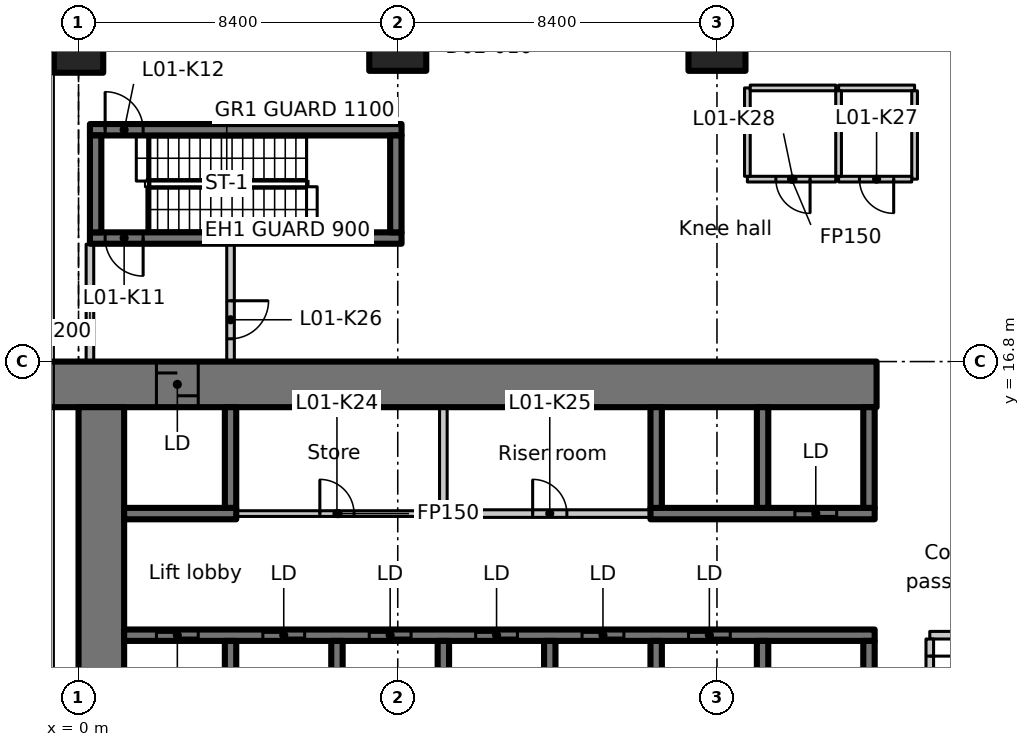
"""IFC4 building model, lengths in metres.
Left out: names, types, materials, properties, quantities, classifications, styles, units other than length and angle.
Written with IfcOpenShell. Run it as: python <this file> out.ifc"""

import sys

from ifc_helpers import new_model, si_unit, direction, frame, frame_2d, origin, origin_2d, place, context, subcontext, project, spatial, rectangle, extrude, element, fill, save


model = new_model("IFC4")
c1 = context("Model", 3, precision=1e-05, world=origin(), true_north=direction((0.0, 1.0)))
c2 = subcontext(c1, "Body", "Model", "MODEL_VIEW")
j1 = project(units=[si_unit("LENGTHUNIT", "METRE"), si_unit("PLANEANGLEUNIT", "RADIAN")], contexts=[c1])
p1 = place(None, origin())
s1 = spatial("IfcSite", under=j1, at=p1, CompositionType="ELEMENT")
p2 = place(p1, origin())
s2 = spatial("IfcBuilding", under=s1, at=p2, CompositionType="ELEMENT")
p3 = place(p2, frame((0.0, 0.0, 7.0)))
s3 = spatial("IfcBuildingStorey", under=s2, at=p3, CompositionType="ELEMENT", Elevation=7.0)
p4 = place(p3, frame((0.0, 25.2, 0.0), z_axis=(0.0, 0.0, 1.0), x_axis=(1.0, 0.0, 0.0)))
e1 = element("IfcColumn", 1, at=p4, inside=s3, PredefinedType="COLUMN", context=c2, shape_type="SweptSolid", body=[
    extrude(rectangle(XDim=1.3, YDim=1.6, at=origin_2d()), origin(), (0.0, 0.0, 1.0), 5.25),
])
for number, where, z_axis, x_axis in (
    (2, (8.4, 25.2, 0.0), (0.0, 0.0, 1.0), (1.0, 0.0, 0.0)),
    (3, (16.8, 25.2, 0.0), (0.0, 0.0, 1.0), (1.0, 0.0, 0.0)),
):
    element("IfcColumn", number, at=place(p3, frame(where, z_axis=z_axis, x_axis=x_axis)), inside=s3, PredefinedType="COLUMN", context=c2, shape_type="SweptSolid", body=[
        extrude(rectangle(XDim=1.5, YDim=1.5, at=origin_2d()), origin(), (0.0, 0.0, 1.0), 5.25),
    ])
p5 = place(p3, frame((-1.1, 16.2, 0.0), z_axis=(0.0, 0.0, 1.0), x_axis=(1.0, 0.0, 0.0)))
e4 = element("IfcWall", 4, at=p5, inside=s3, PredefinedType="SHEAR", context=c2, shape_type="SweptSolid", body=[
    extrude(rectangle(XDim=22.1, YDim=1.2, at=frame_2d((11.05, 0.0))), origin(), (0.0, 0.0, 1.0), 5.25),
])
p6 = place(p5, frame((3.15, 0.0, 0.0)))
e5 = element("IfcOpeningElement", 5, at=p6, cuts=e4, PredefinedType="OPENING", context=c2, shape_type="SweptSolid", body=[
    extrude(rectangle(XDim=1.1, YDim=2.3, at=frame_2d((0.55, 1.15))), frame((0.0, 0.61, 0.0), z_axis=(0.0, -1.0, 0.0), x_axis=(1.0, 0.0, 0.0)), (0.0, 0.0, 1.0), 1.22),
])
p7 = place(p3, frame((0.6, 6.736, 0.0), z_axis=(0.0, 0.0, 1.0), x_axis=(0.0, 1.0, 0.0)))
e6 = element("IfcWall", 6, at=p7, inside=s3, PredefinedType="SHEAR", context=c2, shape_type="SweptSolid", body=[
    extrude(rectangle(XDim=8.864, YDim=1.2, at=frame_2d((4.432, 0.0))), origin(), (0.0, 0.0, 1.0), 5.25),
])
p8 = place(p3, frame((1.2, 9.6, 0.0), z_axis=(0.0, 0.0, 1.0), x_axis=(1.0, 0.0, 0.0)))
e7 = element("IfcWall", 7, at=p8, inside=s3, PredefinedType="SHEAR", context=c2, shape_type="SweptSolid", body=[
    extrude(rectangle(XDim=19.75, YDim=0.3, at=frame_2d((9.875, 0.0))), origin(), (0.0, 0.0, 1.0), 5.25),
])
p9 = place(p8, frame((0.85, 0.0, 0.0)))
e8 = element("IfcOpeningElement", 8, at=p9, cuts=e7, PredefinedType="OPENING", context=c2, shape_type="SweptSolid", body=[
    extrude(rectangle(XDim=1.1, YDim=2.3, at=frame_2d((0.55, 1.15))), frame((0.0, 0.16, 0.0), z_axis=(0.0, -1.0, 0.0), x_axis=(1.0, 0.0, 0.0)), (0.0, 0.0, 1.0), 0.32),
])
p10 = place(p8, frame((3.65, 0.0, 0.0)))
e9 = element("IfcOpeningElement", 9, at=p10, cuts=e7, PredefinedType="OPENING", context=c2, shape_type="SweptSolid", body=[
    extrude(rectangle(XDim=1.1, YDim=2.3, at=frame_2d((0.55, 1.15))), frame((0.0, 0.16, 0.0), z_axis=(0.0, -1.0, 0.0), x_axis=(1.0, 0.0, 0.0)), (0.0, 0.0, 1.0), 0.32),
])
p11 = place(p8, frame((6.45, 0.0, 0.0)))
e10 = element("IfcOpeningElement", 10, at=p11, cuts=e7, PredefinedType="OPENING", context=c2, shape_type="SweptSolid", body=[
    extrude(rectangle(XDim=1.1, YDim=2.3, at=frame_2d((0.55, 1.15))), frame((0.0, 0.16, 0.0), z_axis=(0.0, -1.0, 0.0), x_axis=(1.0, 0.0, 0.0)), (0.0, 0.0, 1.0), 0.32),
])
p12 = place(p8, frame((9.25, 0.0, 0.0)))
e11 = element("IfcOpeningElement", 11, at=p12, cuts=e7, PredefinedType="OPENING", context=c2, shape_type="SweptSolid", body=[
    extrude(rectangle(XDim=1.1, YDim=2.3, at=frame_2d((0.55, 1.15))), frame((0.0, 0.16, 0.0), z_axis=(0.0, -1.0, 0.0), x_axis=(1.0, 0.0, 0.0)), (0.0, 0.0, 1.0), 0.32),
])
p13 = place(p8, frame((12.05, 0.0, 0.0)))
e12 = element("IfcOpeningElement", 12, at=p13, cuts=e7, PredefinedType="OPENING", context=c2, shape_type="SweptSolid", body=[
    extrude(rectangle(XDim=1.1, YDim=2.3, at=frame_2d((0.55, 1.15))), frame((0.0, 0.16, 0.0), z_axis=(0.0, -1.0, 0.0), x_axis=(1.0, 0.0, 0.0)), (0.0, 0.0, 1.0), 0.32),
])
p14 = place(p8, frame((14.85, 0.0, 0.0)))
e13 = element("IfcOpeningElement", 13, at=p14, cuts=e7, PredefinedType="OPENING", context=c2, shape_type="SweptSolid", body=[
    extrude(rectangle(XDim=1.1, YDim=2.3, at=frame_2d((0.55, 1.15))), frame((0.0, 0.16, 0.0), z_axis=(0.0, -1.0, 0.0), x_axis=(1.0, 0.0, 0.0)), (0.0, 0.0, 1.0), 0.32),
])
for number, where, z_axis, x_axis in (
    (14, (4.0, 7.15, 0.0), (0.0, 0.0, 1.0), (0.0, 1.0, 0.0)),
    (15, (6.8, 7.15, 0.0), (0.0, 0.0, 1.0), (0.0, 1.0, 0.0)),
    (16, (9.6, 7.15, 0.0), (0.0, 0.0, 1.0), (0.0, 1.0, 0.0)),
    (17, (12.4, 7.15, 0.0), (0.0, 0.0, 1.0), (0.0, 1.0, 0.0)),
    (18, (15.2, 7.15, 0.0), (0.0, 0.0, 1.0), (0.0, 1.0, 0.0)),
    (19, (18.0, 7.15, 0.0), (0.0, 0.0, 1.0), (0.0, 1.0, 0.0)),
    (20, (20.8, 7.15, 0.0), (0.0, 0.0, 1.0), (0.0, 1.0, 0.0)),
):
    element("IfcWall", number, at=place(p3, frame(where, z_axis=z_axis, x_axis=x_axis)), inside=s3, PredefinedType="SHEAR", context=c2, shape_type="SweptSolid", body=[
        extrude(rectangle(XDim=2.3, YDim=0.3, at=frame_2d((1.15, 0.0))), origin(), (0.0, 0.0, 1.0), 5.25),
    ])
p15 = place(p3, frame((1.2, 12.8, 0.0), z_axis=(0.0, 0.0, 1.0), x_axis=(1.0, 0.0, 0.0)))
e21 = element("IfcWall", 21, at=p15, inside=s3, PredefinedType="SHEAR", context=c2, shape_type="SweptSolid", body=[
    extrude(rectangle(XDim=2.95, YDim=0.3, at=frame_2d((1.475, 0.0))), origin(), (0.0, 0.0, 1.0), 5.25),
])
p16 = place(p3, frame((4.0, 12.95, 0.0), z_axis=(0.0, 0.0, 1.0), x_axis=(0.0, 1.0, 0.0)))
e22 = element("IfcWall", 22, at=p16, inside=s3, PredefinedType="SHEAR", context=c2, shape_type="SweptSolid", body=[
    extrude(rectangle(XDim=2.65, YDim=0.3, at=frame_2d((1.325, 0.0))), origin(), (0.0, 0.0, 1.0), 5.25),
])
p17 = place(p3, frame((15.05, 12.8, 0.0), z_axis=(0.0, 0.0, 1.0), x_axis=(1.0, 0.0, 0.0)))
e23 = element("IfcWall", 23, at=p17, inside=s3, PredefinedType="SHEAR", context=c2, shape_type="SweptSolid", body=[
    extrude(rectangle(XDim=5.9, YDim=0.3, at=frame_2d((2.95, 0.0))), origin(), (0.0, 0.0, 1.0), 5.25),
])
p18 = place(p17, frame((3.8, 0.0, 0.0)))
e24 = element("IfcOpeningElement", 24, at=p18, cuts=e23, PredefinedType="OPENING", context=c2, shape_type="SweptSolid", body=[
    extrude(rectangle(XDim=1.1, YDim=2.3, at=frame_2d((0.55, 1.15))), frame((0.0, 0.16, 0.0), z_axis=(0.0, -1.0, 0.0), x_axis=(1.0, 0.0, 0.0)), (0.0, 0.0, 1.0), 0.32),
])
for number, where, z_axis, x_axis in (
    (25, (15.2, 12.95, 0.0), (0.0, 0.0, 1.0), (0.0, 1.0, 0.0)),
    (26, (18.0, 12.95, 0.0), (0.0, 0.0, 1.0), (0.0, 1.0, 0.0)),
    (27, (20.8, 12.95, 0.0), (0.0, 0.0, 1.0), (0.0, 1.0, 0.0)),
):
    element("IfcWall", number, at=place(p3, frame(where, z_axis=z_axis, x_axis=x_axis)), inside=s3, PredefinedType="SHEAR", context=c2, shape_type="SweptSolid", body=[
        extrude(rectangle(XDim=2.65, YDim=0.3, at=frame_2d((1.325, 0.0))), origin(), (0.0, 0.0, 1.0), 5.25),
    ])
p19 = place(p3, frame((8.5, 20.05, 0.0), z_axis=(0.0, 0.0, 1.0), x_axis=(-1.0, 0.0, 0.0)))
e28 = element("IfcWall", 28, at=p19, inside=s3, PredefinedType="SHEAR", context=c2, shape_type="SweptSolid", body=[
    extrude(rectangle(XDim=8.2, YDim=0.3, at=frame_2d((4.1, 0.0))), origin(), (0.0, 0.0, 1.0), 5.25),
])
p20 = place(p19, frame((6.8, 0.0, 0.0)))
e29 = element("IfcOpeningElement", 29, at=p20, cuts=e28, PredefinedType="OPENING", context=c2, shape_type="SweptSolid", body=[
    extrude(rectangle(XDim=1.0, YDim=2.1, at=frame_2d((0.5, 1.05))), frame((0.0, 0.16, 0.0), z_axis=(0.0, -1.0, 0.0), x_axis=(1.0, 0.0, 0.0)), (0.0, 0.0, 1.0), 0.32),
])
p21 = place(p3, frame((0.3, 22.9, 0.0), z_axis=(0.0, 0.0, 1.0), x_axis=(1.0, 0.0, 0.0)))
e30 = element("IfcWall", 30, at=p21, inside=s3, PredefinedType="SHEAR", context=c2, shape_type="SweptSolid", body=[
    extrude(rectangle(XDim=8.2, YDim=0.3, at=frame_2d((4.1, 0.0))), origin(), (0.0, 0.0, 1.0), 5.25),
])
p22 = place(p21, frame((0.4, 0.0, 0.0)))
e31 = element("IfcOpeningElement", 31, at=p22, cuts=e30, PredefinedType="OPENING", context=c2, shape_type="SweptSolid", body=[
    extrude(rectangle(XDim=1.0, YDim=2.1, at=frame_2d((0.5, 1.05))), frame((0.0, 0.16, 0.0), z_axis=(0.0, -1.0, 0.0), x_axis=(1.0, 0.0, 0.0)), (0.0, 0.0, 1.0), 0.32),
])
for number, where, z_axis, x_axis in (
    (32, (0.45, 20.2, 0.0), (0.0, 0.0, 1.0), (0.0, 1.0, 0.0)),
    (33, (8.35, 20.2, 0.0), (0.0, 0.0, 1.0), (0.0, 1.0, 0.0)),
):
    element("IfcWall", number, at=place(p3, frame(where, z_axis=z_axis, x_axis=x_axis)), inside=s3, PredefinedType="SHEAR", context=c2, shape_type="SweptSolid", body=[
        extrude(rectangle(XDim=2.55, YDim=0.3, at=frame_2d((1.275, 0.0))), origin(), (0.0, 0.0, 1.0), 5.25),
    ])
p23 = place(p3, frame((0.3, 16.812, 0.0), z_axis=(0.0, 0.0, 1.0), x_axis=(0.0, 1.0, 0.0)))
e34 = element("IfcWall", 34, at=p23, inside=s3, PredefinedType="PARTITIONING", context=c2, shape_type="SweptSolid", body=[
    extrude(rectangle(XDim=3.076, YDim=0.2, at=frame_2d((1.538, 0.0))), origin(), (0.0, 0.0, 1.0), 4.88),
])
p24 = place(p3, frame((4.0, 19.888, 0.0), z_axis=(0.0, 0.0, 1.0), x_axis=(0.0, -1.0, 0.0)))
e35 = element("IfcWall", 35, at=p24, inside=s3, PredefinedType="PARTITIONING", context=c2, shape_type="SweptSolid", body=[
    extrude(rectangle(XDim=3.076, YDim=0.2, at=frame_2d((1.538, 0.0))), origin(), (0.0, 0.0, 1.0), 5.25),
])
p25 = place(p24, frame((1.488, 0.0, 0.0)))
e36 = element("IfcOpeningElement", 36, at=p25, cuts=e35, PredefinedType="OPENING", context=c2, shape_type="SweptSolid", body=[
    extrude(rectangle(XDim=1.0, YDim=2.1, at=frame_2d((0.5, 1.05))), frame((0.0, 0.11, 0.0), z_axis=(0.0, -1.0, 0.0), x_axis=(1.0, 0.0, 0.0)), (0.0, 0.0, 1.0), 0.22),
])
p26 = place(p3, frame((9.6, 15.588, 0.0), z_axis=(0.0, 0.0, 1.0), x_axis=(0.0, -1.0, 0.0)))
e37 = element("IfcWall", 37, at=p26, inside=s3, PredefinedType="PARTITIONING", context=c2, shape_type="SweptSolid", body=[
    extrude(rectangle(XDim=2.788, YDim=0.2, at=frame_2d((1.394, 0.0))), origin(), (0.0, 0.0, 1.0), 5.25),
])
p27 = place(p3, frame((9.7, 12.8, 0.0), z_axis=(0.0, 0.0, 1.0), x_axis=(1.0, 0.0, 0.0)))
e38 = element("IfcWall", 38, at=p27, inside=s3, PredefinedType="PARTITIONING", context=c2, shape_type="SweptSolid", body=[
    extrude(rectangle(XDim=5.338, YDim=0.2, at=frame_2d((2.669, 0.0))), origin(), (0.0, 0.0, 1.0), 5.25),
])
p28 = place(p27, frame((2.25, 0.0, 0.0)))
e39 = element("IfcOpeningElement", 39, at=p28, cuts=e38, PredefinedType="OPENING", context=c2, shape_type="SweptSolid", body=[
    extrude(rectangle(XDim=0.9, YDim=2.1, at=frame_2d((0.45, 1.05))), frame((0.0, 0.11, 0.0), z_axis=(0.0, -1.0, 0.0), x_axis=(1.0, 0.0, 0.0)), (0.0, 0.0, 1.0), 0.22),
])
p29 = place(p3, frame((23.988, 9.6, 0.0), z_axis=(0.0, 0.0, 1.0), x_axis=(-1.0, 0.0, 0.0)))
e40 = element("IfcWall", 40, at=p29, inside=s3, PredefinedType="PARTITIONING", context=c2, shape_type="SweptSolid", body=[
    extrude(rectangle(XDim=1.588, YDim=0.2, at=frame_2d((0.794, 0.0))), origin(), (0.0, 0.0, 1.0), 5.25),
])
p30 = place(p3, frame((22.4, 9.5, 0.0), z_axis=(0.0, 0.0, 1.0), x_axis=(0.0, -1.0, 0.0)))
e41 = element("IfcWall", 41, at=p30, inside=s3, PredefinedType="PARTITIONING", context=c2, shape_type="SweptSolid", body=[
    extrude(rectangle(XDim=1.9, YDim=0.2, at=frame_2d((0.95, 0.0))), origin(), (0.0, 0.0, 1.0), 5.25),
])
p31 = place(p30, frame((0.45, 0.0, 0.0)))
e42 = element("IfcOpeningElement", 42, at=p31, cuts=e41, PredefinedType="OPENING", context=c2, shape_type="SweptSolid", body=[
    extrude(rectangle(XDim=0.9, YDim=2.1, at=frame_2d((0.45, 1.05))), frame((0.0, 0.11, 0.0), z_axis=(0.0, -1.0, 0.0), x_axis=(1.0, 0.0, 0.0)), (0.0, 0.0, 1.0), 0.22),
])
p32 = place(p3, frame((4.162, 12.8, 0.0), z_axis=(0.0, 0.0, 1.0), x_axis=(1.0, 0.0, 0.0)))
e43 = element("IfcWall", 43, at=p32, inside=s3, PredefinedType="PARTITIONING", context=c2, shape_type="SweptSolid", body=[
    extrude(rectangle(XDim=5.338, YDim=0.15, at=frame_2d((2.669, 0.0))), origin(), (0.0, 0.0, 1.0), 5.25),
])
p33 = place(p32, frame((2.188, 0.0, 0.0)))
e44 = element("IfcOpeningElement", 44, at=p33, cuts=e43, PredefinedType="OPENING", context=c2, shape_type="SweptSolid", body=[
    extrude(rectangle(XDim=0.9, YDim=2.1, at=frame_2d((0.45, 1.05))), frame((0.0, 0.085, 0.0), z_axis=(0.0, -1.0, 0.0), x_axis=(1.0, 0.0, 0.0)), (0.0, 0.0, 1.0), 0.17),
])
p34 = place(p3, frame((20.0, 24.0, 0.0), z_axis=(0.0, 0.0, 1.0), x_axis=(1.0, 0.0, 0.0)))
e45 = element("IfcWall", 45, at=p34, inside=s3, PredefinedType="PARTITIONING", context=c2, shape_type="SweptSolid", body=[
    extrude(rectangle(XDim=2.0, YDim=0.15, at=frame_2d((1.0, 0.0))), origin(), (0.0, 0.0, 1.0), 5.25),
])
p35 = place(p3, frame((22.0, 23.925, 0.0), z_axis=(0.0, 0.0, 1.0), x_axis=(0.0, -1.0, 0.0)))
e46 = element("IfcWall", 46, at=p35, inside=s3, PredefinedType="PARTITIONING", context=c2, shape_type="SweptSolid", body=[
    extrude(rectangle(XDim=2.325, YDim=0.15, at=frame_2d((1.163, 0.0))), origin(), (0.0, 0.0, 1.0), 5.25),
])
p36 = place(p3, frame((21.925, 21.6, 0.0), z_axis=(0.0, 0.0, 1.0), x_axis=(-1.0, 0.0, 0.0)))
e47 = element("IfcWall", 47, at=p36, inside=s3, PredefinedType="PARTITIONING", context=c2, shape_type="SweptSolid", body=[
    extrude(rectangle(XDim=1.925, YDim=0.15, at=frame_2d((0.962, 0.0))), origin(), (0.0, 0.0, 1.0), 5.25),
])
p37 = place(p36, frame((0.475, 0.0, 0.0)))
e48 = element("IfcOpeningElement", 48, at=p37, cuts=e47, PredefinedType="OPENING", context=c2, shape_type="SweptSolid", body=[
    extrude(rectangle(XDim=0.9, YDim=2.1, at=frame_2d((0.45, 1.05))), frame((0.0, 0.085, 0.0), z_axis=(0.0, -1.0, 0.0), x_axis=(1.0, 0.0, 0.0)), (0.0, 0.0, 1.0), 0.17),
])
p38 = place(p3, frame((20.0, 21.675, 0.0), z_axis=(0.0, 0.0, 1.0), x_axis=(0.0, 1.0, 0.0)))
e49 = element("IfcWall", 49, at=p38, inside=s3, PredefinedType="PARTITIONING", context=c2, shape_type="SweptSolid", body=[
    extrude(rectangle(XDim=2.25, YDim=0.15, at=frame_2d((1.125, 0.0))), origin(), (0.0, 0.0, 1.0), 5.25),
])
p39 = place(p3, frame((19.925, 21.6, 0.0), z_axis=(0.0, 0.0, 1.0), x_axis=(-1.0, 0.0, 0.0)))
e50 = element("IfcWall", 50, at=p39, inside=s3, PredefinedType="PARTITIONING", context=c2, shape_type="SweptSolid", body=[
    extrude(rectangle(XDim=2.325, YDim=0.15, at=frame_2d((1.163, 0.0))), origin(), (0.0, 0.0, 1.0), 5.25),
])
p40 = place(p39, frame((0.675, 0.0, 0.0)))
e51 = element("IfcOpeningElement", 51, at=p40, cuts=e50, PredefinedType="OPENING", context=c2, shape_type="SweptSolid", body=[
    extrude(rectangle(XDim=0.9, YDim=2.1, at=frame_2d((0.45, 1.05))), frame((0.0, 0.085, 0.0), z_axis=(0.0, -1.0, 0.0), x_axis=(1.0, 0.0, 0.0)), (0.0, 0.0, 1.0), 0.17),
])
p41 = place(p3, frame((17.6, 21.675, 0.0), z_axis=(0.0, 0.0, 1.0), x_axis=(0.0, 1.0, 0.0)))
e52 = element("IfcWall", 52, at=p41, inside=s3, PredefinedType="PARTITIONING", context=c2, shape_type="SweptSolid", body=[
    extrude(rectangle(XDim=2.325, YDim=0.15, at=frame_2d((1.163, 0.0))), origin(), (0.0, 0.0, 1.0), 5.25),
])
p42 = place(p3, frame((17.675, 24.0, 0.0), z_axis=(0.0, 0.0, 1.0), x_axis=(1.0, 0.0, 0.0)))
e53 = element("IfcWall", 53, at=p42, inside=s3, PredefinedType="PARTITIONING", context=c2, shape_type="SweptSolid", body=[
    extrude(rectangle(XDim=2.25, YDim=0.15, at=frame_2d((1.125, 0.0))), origin(), (0.0, 0.0, 1.0), 5.25),
])
p43 = place(p9, origin())
e54 = element("IfcDoor", 54, at=p43, inside=s3, OperationType="SLIDING_TO_LEFT", PredefinedType="DOOR", context=c2, shape_type="SweptSolid", body=[
    extrude(rectangle(XDim=1.1, YDim=2.3, at=frame_2d((0.55, 1.15))), frame((0.0, 0.025, 0.0), z_axis=(0.0, -1.0, 0.0), x_axis=(1.0, 0.0, 0.0)), (0.0, 0.0, 1.0), 0.05),
])
fill(e8, e54)
p44 = place(p10, origin())
e55 = element("IfcDoor", 55, at=p44, inside=s3, OperationType="SLIDING_TO_LEFT", PredefinedType="DOOR", context=c2, shape_type="SweptSolid", body=[
    extrude(rectangle(XDim=1.1, YDim=2.3, at=frame_2d((0.55, 1.15))), frame((0.0, 0.025, 0.0), z_axis=(0.0, -1.0, 0.0), x_axis=(1.0, 0.0, 0.0)), (0.0, 0.0, 1.0), 0.05),
])
fill(e9, e55)
p45 = place(p11, origin())
e56 = element("IfcDoor", 56, at=p45, inside=s3, OperationType="SLIDING_TO_LEFT", PredefinedType="DOOR", context=c2, shape_type="SweptSolid", body=[
    extrude(rectangle(XDim=1.1, YDim=2.3, at=frame_2d((0.55, 1.15))), frame((0.0, 0.025, 0.0), z_axis=(0.0, -1.0, 0.0), x_axis=(1.0, 0.0, 0.0)), (0.0, 0.0, 1.0), 0.05),
])
fill(e10, e56)
p46 = place(p12, origin())
e57 = element("IfcDoor", 57, at=p46, inside=s3, OperationType="SLIDING_TO_LEFT", PredefinedType="DOOR", context=c2, shape_type="SweptSolid", body=[
    extrude(rectangle(XDim=1.1, YDim=2.3, at=frame_2d((0.55, 1.15))), frame((0.0, 0.025, 0.0), z_axis=(0.0, -1.0, 0.0), x_axis=(1.0, 0.0, 0.0)), (0.0, 0.0, 1.0), 0.05),
])
fill(e11, e57)
p47 = place(p13, origin())
e58 = element("IfcDoor", 58, at=p47, inside=s3, OperationType="SLIDING_TO_LEFT", PredefinedType="DOOR", context=c2, shape_type="SweptSolid", body=[
    extrude(rectangle(XDim=1.1, YDim=2.3, at=frame_2d((0.55, 1.15))), frame((0.0, 0.025, 0.0), z_axis=(0.0, -1.0, 0.0), x_axis=(1.0, 0.0, 0.0)), (0.0, 0.0, 1.0), 0.05),
])
fill(e12, e58)
p48 = place(p14, origin())
e59 = element("IfcDoor", 59, at=p48, inside=s3, OperationType="SLIDING_TO_LEFT", PredefinedType="DOOR", context=c2, shape_type="SweptSolid", body=[
    extrude(rectangle(XDim=1.1, YDim=2.3, at=frame_2d((0.55, 1.15))), frame((0.0, 0.025, 0.0), z_axis=(0.0, -1.0, 0.0), x_axis=(1.0, 0.0, 0.0)), (0.0, 0.0, 1.0), 0.05),
])
fill(e13, e59)
p49 = place(p6, origin())
e60 = element("IfcDoor", 60, at=p49, inside=s3, OperationType="SLIDING_TO_LEFT", PredefinedType="DOOR", context=c2, shape_type="SweptSolid", body=[
    extrude(rectangle(XDim=1.1, YDim=2.3, at=frame_2d((0.55, 1.15))), frame((0.0, 0.025, 0.0), z_axis=(0.0, -1.0, 0.0), x_axis=(1.0, 0.0, 0.0)), (0.0, 0.0, 1.0), 0.05),
])
fill(e5, e60)
p50 = place(p18, origin())
e61 = element("IfcDoor", 61, at=p50, inside=s3, OperationType="SLIDING_TO_LEFT", PredefinedType="DOOR", context=c2, shape_type="SweptSolid", body=[
    extrude(rectangle(XDim=1.1, YDim=2.3, at=frame_2d((0.55, 1.15))), frame((0.0, 0.025, 0.0), z_axis=(0.0, -1.0, 0.0), x_axis=(1.0, 0.0, 0.0)), (0.0, 0.0, 1.0), 0.05),
])
fill(e24, e61)
p51 = place(p20, origin())
e62 = element("IfcDoor", 62, at=p51, inside=s3, OperationType="SINGLE_SWING_LEFT", PredefinedType="DOOR", context=c2, shape_type="SweptSolid", body=[
    extrude(rectangle(XDim=1.0, YDim=2.1, at=frame_2d((0.5, 1.05))), frame((0.0, 0.025, 0.0), z_axis=(0.0, -1.0, 0.0), x_axis=(1.0, 0.0, 0.0)), (0.0, 0.0, 1.0), 0.05),
])
fill(e29, e62)
p52 = place(p22, origin())
e63 = element("IfcDoor", 63, at=p52, inside=s3, OperationType="SINGLE_SWING_RIGHT", PredefinedType="DOOR", context=c2, shape_type="SweptSolid", body=[
    extrude(rectangle(XDim=1.0, YDim=2.1, at=frame_2d((0.5, 1.05))), frame((0.0, 0.025, 0.0), z_axis=(0.0, -1.0, 0.0), x_axis=(1.0, 0.0, 0.0)), (0.0, 0.0, 1.0), 0.05),
])
fill(e31, e63)
p53 = place(p31, origin())
e64 = element("IfcDoor", 64, at=p53, inside=s3, OperationType="SINGLE_SWING_LEFT", PredefinedType="DOOR", context=c2, shape_type="SweptSolid", body=[
    extrude(rectangle(XDim=0.9, YDim=2.1, at=frame_2d((0.45, 1.05))), frame((0.0, 0.025, 0.0), z_axis=(0.0, -1.0, 0.0), x_axis=(1.0, 0.0, 0.0)), (0.0, 0.0, 1.0), 0.05),
])
fill(e42, e64)
p54 = place(p33, origin())
e65 = element("IfcDoor", 65, at=p54, inside=s3, OperationType="SINGLE_SWING_RIGHT", PredefinedType="DOOR", context=c2, shape_type="SweptSolid", body=[
    extrude(rectangle(XDim=0.9, YDim=2.1, at=frame_2d((0.45, 1.05))), frame((0.0, 0.025, 0.0), z_axis=(0.0, -1.0, 0.0), x_axis=(1.0, 0.0, 0.0)), (0.0, 0.0, 1.0), 0.05),
])
fill(e44, e65)
p55 = place(p28, origin())
e66 = element("IfcDoor", 66, at=p55, inside=s3, OperationType="SINGLE_SWING_LEFT", PredefinedType="DOOR", context=c2, shape_type="SweptSolid", body=[
    extrude(rectangle(XDim=0.9, YDim=2.1, at=frame_2d((0.45, 1.05))), frame((0.0, 0.025, 0.0), z_axis=(0.0, -1.0, 0.0), x_axis=(1.0, 0.0, 0.0)), (0.0, 0.0, 1.0), 0.05),
])
fill(e39, e66)
p56 = place(p25, origin())
e67 = element("IfcDoor", 67, at=p56, inside=s3, OperationType="SINGLE_SWING_RIGHT", PredefinedType="DOOR", context=c2, shape_type="SweptSolid", body=[
    extrude(rectangle(XDim=1.0, YDim=2.1, at=frame_2d((0.5, 1.05))), frame((0.0, 0.025, 0.0), z_axis=(0.0, -1.0, 0.0), x_axis=(1.0, 0.0, 0.0)), (0.0, 0.0, 1.0), 0.05),
])
fill(e36, e67)
p57 = place(p37, origin())
e68 = element("IfcDoor", 68, at=p57, inside=s3, OperationType="SINGLE_SWING_LEFT", PredefinedType="DOOR", context=c2, shape_type="SweptSolid", body=[
    extrude(rectangle(XDim=0.9, YDim=2.1, at=frame_2d((0.45, 1.05))), frame((0.0, 0.025, 0.0), z_axis=(0.0, -1.0, 0.0), x_axis=(1.0, 0.0, 0.0)), (0.0, 0.0, 1.0), 0.05),
])
fill(e48, e68)
p58 = place(p40, origin())
e69 = element("IfcDoor", 69, at=p58, inside=s3, OperationType="SINGLE_SWING_RIGHT", PredefinedType="DOOR", context=c2, shape_type="SweptSolid", body=[
    extrude(rectangle(XDim=0.9, YDim=2.1, at=frame_2d((0.45, 1.05))), frame((0.0, 0.025, 0.0), z_axis=(0.0, -1.0, 0.0), x_axis=(1.0, 0.0, 0.0)), (0.0, 0.0, 1.0), 0.05),
])
fill(e51, e69)
save(model, sys.argv[1])
